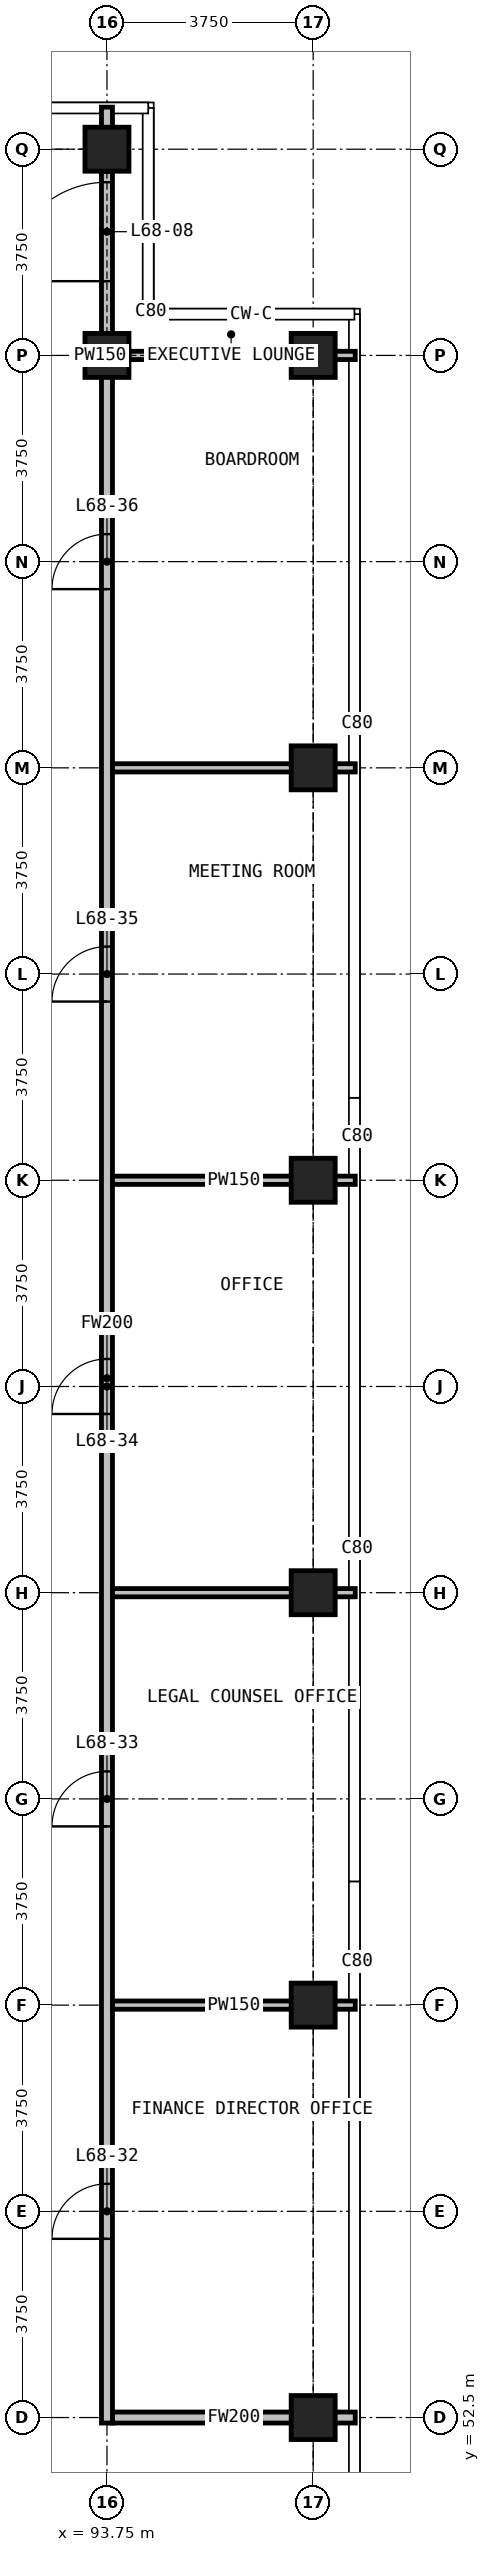
"""IFC4 building model, lengths in metres.
Left out: names, types, materials, properties, quantities, classifications, styles, units other than length and angle.
Written with IfcOpenShell. Run it as: python <this file> out.ifc"""

import sys

from ifc_helpers import new_model, si_unit, direction, frame, frame_2d, origin, origin_2d, place, context, subcontext, project, spatial, rectangle, extrude, element, fill, save


model = new_model("IFC4")
c1 = context("Model", 3, precision=1e-05, world=origin(), true_north=direction((0.0, 1.0)))
c2 = subcontext(c1, "Body", "Model", "MODEL_VIEW")
j1 = project(units=[si_unit("LENGTHUNIT", "METRE"), si_unit("PLANEANGLEUNIT", "RADIAN")], contexts=[c1])
p1 = place(None, origin())
s1 = spatial("IfcSite", under=j1, at=p1, CompositionType="ELEMENT")
p2 = place(p1, origin())
s2 = spatial("IfcBuilding", under=s1, at=p2, CompositionType="ELEMENT")
p3 = place(p2, frame((0.0, 0.0, 262.1)))
s3 = spatial("IfcBuildingStorey", under=s2, at=p3, CompositionType="ELEMENT", Elevation=262.1)
for number, where, z_axis, x_axis in (
    (1, (93.75, 90.0, 0.0), (0.0, 0.0, 1.0), (1.0, 0.0, 0.0)),
    (2, (93.75, 93.75, 0.0), (0.0, 0.0, 1.0), (1.0, 0.0, 0.0)),
    (3, (97.5, 52.5, 0.0), (0.0, 0.0, 1.0), (1.0, 0.0, 0.0)),
    (4, (97.5, 60.0, 0.0), (0.0, 0.0, 1.0), (1.0, 0.0, 0.0)),
    (5, (97.5, 67.5, 0.0), (0.0, 0.0, 1.0), (1.0, 0.0, 0.0)),
    (6, (97.5, 75.0, 0.0), (0.0, 0.0, 1.0), (1.0, 0.0, 0.0)),
    (7, (97.5, 82.5, 0.0), (0.0, 0.0, 1.0), (1.0, 0.0, 0.0)),
    (8, (97.5, 90.0, 0.0), (0.0, 0.0, 1.0), (1.0, 0.0, 0.0)),
):
    element("IfcColumn", number, at=place(p3, frame(where, z_axis=z_axis, x_axis=x_axis)), inside=s3, PredefinedType="COLUMN", context=c2, shape_type="SweptSolid", body=[
        extrude(rectangle(XDim=0.8, YDim=0.8, at=origin_2d()), origin(), (0.0, 0.0, 1.0), 3.6),
    ])
p4 = place(p3, frame((93.85, 52.5, 0.0), z_axis=(0.0, 0.0, 1.0), x_axis=(1.0, 0.0, 0.0)))
e9 = element("IfcWall", 9, at=p4, inside=s3, PredefinedType="PARTITIONING", context=c2, shape_type="SweptSolid", body=[
    extrude(rectangle(XDim=4.415, YDim=0.2, at=frame_2d((2.208, 0.0))), origin(), (0.0, 0.0, 1.0), 3.3),
])
p5 = place(p3, frame((93.75, 52.4, 0.0), z_axis=(0.0, 0.0, 1.0), x_axis=(0.0, 1.0, 0.0)))
e10 = element("IfcWall", 10, at=p5, inside=s3, PredefinedType="PARTITIONING", context=c2, shape_type="SweptSolid", body=[
    extrude(rectangle(XDim=38.0, YDim=0.2, at=frame_2d((19.0, 0.0))), origin(), (0.0, 0.0, 1.0), 3.3),
])
p6 = place(p5, frame((3.35, 0.0, 0.0)))
e11 = element("IfcOpeningElement", 11, at=p6, cuts=e10, PredefinedType="OPENING", context=c2, shape_type="SweptSolid", body=[
    extrude(rectangle(XDim=1.0, YDim=2.2, at=frame_2d((0.5, 1.1))), frame((0.0, 0.11, 0.0), z_axis=(0.0, -1.0, 0.0), x_axis=(1.0, 0.0, 0.0)), (0.0, 0.0, 1.0), 0.22),
])
p7 = place(p5, frame((10.85, 0.0, 0.0)))
e12 = element("IfcOpeningElement", 12, at=p7, cuts=e10, PredefinedType="OPENING", context=c2, shape_type="SweptSolid", body=[
    extrude(rectangle(XDim=1.0, YDim=2.2, at=frame_2d((0.5, 1.1))), frame((0.0, 0.11, 0.0), z_axis=(0.0, -1.0, 0.0), x_axis=(1.0, 0.0, 0.0)), (0.0, 0.0, 1.0), 0.22),
])
p8 = place(p5, frame((18.35, 0.0, 0.0)))
e13 = element("IfcOpeningElement", 13, at=p8, cuts=e10, PredefinedType="OPENING", context=c2, shape_type="SweptSolid", body=[
    extrude(rectangle(XDim=1.0, YDim=2.2, at=frame_2d((0.5, 1.1))), frame((0.0, 0.11, 0.0), z_axis=(0.0, -1.0, 0.0), x_axis=(1.0, 0.0, 0.0)), (0.0, 0.0, 1.0), 0.22),
])
p9 = place(p5, frame((25.85, 0.0, 0.0)))
e14 = element("IfcOpeningElement", 14, at=p9, cuts=e10, PredefinedType="OPENING", context=c2, shape_type="SweptSolid", body=[
    extrude(rectangle(XDim=1.0, YDim=2.2, at=frame_2d((0.5, 1.1))), frame((0.0, 0.11, 0.0), z_axis=(0.0, -1.0, 0.0), x_axis=(1.0, 0.0, 0.0)), (0.0, 0.0, 1.0), 0.22),
])
p10 = place(p5, frame((33.35, 0.0, 0.0)))
e15 = element("IfcOpeningElement", 15, at=p10, cuts=e10, PredefinedType="OPENING", context=c2, shape_type="SweptSolid", body=[
    extrude(rectangle(XDim=1.0, YDim=2.2, at=frame_2d((0.5, 1.1))), frame((0.0, 0.11, 0.0), z_axis=(0.0, -1.0, 0.0), x_axis=(1.0, 0.0, 0.0)), (0.0, 0.0, 1.0), 0.22),
])
p11 = place(p3, frame((93.75, 90.4, 0.0), z_axis=(0.0, 0.0, 1.0), x_axis=(0.0, 1.0, 0.0)))
e16 = element("IfcWall", 16, at=p11, inside=s3, PredefinedType="PARTITIONING", context=c2, shape_type="SweptSolid", body=[
    extrude(rectangle(XDim=2.95, YDim=0.2, at=frame_2d((1.475, 0.0))), origin(), (0.0, 0.0, 1.0), 2.5),
])
p12 = place(p11, frame((0.95, 0.0, 0.0)))
e17 = element("IfcOpeningElement", 17, at=p12, cuts=e16, PredefinedType="OPENING", context=c2, shape_type="SweptSolid", body=[
    extrude(rectangle(XDim=1.8, YDim=2.2, at=frame_2d((0.9, 1.1))), frame((0.0, 0.11, 0.0), z_axis=(0.0, -1.0, 0.0), x_axis=(1.0, 0.0, 0.0)), (0.0, 0.0, 1.0), 0.22),
])
p13 = place(p3, frame((93.75, 93.35, 0.0), z_axis=(0.0, 0.0, 1.0), x_axis=(0.0, 1.0, 0.0)))
e18 = element("IfcWall", 18, at=p13, inside=s3, PredefinedType="PARTITIONING", context=c2, shape_type="SweptSolid", body=[
    extrude(rectangle(XDim=1.165, YDim=0.2, at=frame_2d((0.583, 0.0))), origin(), (0.0, 0.0, 1.0), 3.3),
])
for number, where, z_axis, x_axis in (
    (19, (93.85, 60.0, 0.0), (0.0, 0.0, 1.0), (1.0, 0.0, 0.0)),
    (20, (93.85, 67.5, 0.0), (0.0, 0.0, 1.0), (1.0, 0.0, 0.0)),
    (21, (93.85, 75.0, 0.0), (0.0, 0.0, 1.0), (1.0, 0.0, 0.0)),
    (22, (93.85, 82.5, 0.0), (0.0, 0.0, 1.0), (1.0, 0.0, 0.0)),
):
    element("IfcWall", number, at=place(p3, frame(where, z_axis=z_axis, x_axis=x_axis)), inside=s3, PredefinedType="PARTITIONING", context=c2, shape_type="SweptSolid", body=[
        extrude(rectangle(XDim=4.415, YDim=0.15, at=frame_2d((2.208, 0.0))), origin(), (0.0, 0.0, 1.0), 3.3),
    ])
p14 = place(p3, frame((93.85, 90.0, 0.0), z_axis=(0.0, 0.0, 1.0), x_axis=(1.0, 0.0, 0.0)))
e23 = element("IfcWall", 23, at=p14, inside=s3, PredefinedType="PARTITIONING", context=c2, shape_type="SweptSolid", body=[
    extrude(rectangle(XDim=0.3, YDim=0.15, at=frame_2d((0.15, 0.0))), origin(), (0.0, 0.0, 1.0), 3.3),
])
p15 = place(p3, frame((94.15, 90.0, 0.0), z_axis=(0.0, 0.0, 1.0), x_axis=(1.0, 0.0, 0.0)))
e24 = element("IfcWall", 24, at=p15, inside=s3, PredefinedType="PARTITIONING", context=c2, shape_type="SweptSolid", body=[
    extrude(rectangle(XDim=2.95, YDim=0.15, at=frame_2d((1.475, 0.0))), origin(), (0.0, 0.0, 1.0), 2.5),
])
p16 = place(p3, frame((97.1, 90.0, 0.0), z_axis=(0.0, 0.0, 1.0), x_axis=(1.0, 0.0, 0.0)))
e25 = element("IfcWall", 25, at=p16, inside=s3, PredefinedType="PARTITIONING", context=c2, shape_type="SweptSolid", body=[
    extrude(rectangle(XDim=1.165, YDim=0.15, at=frame_2d((0.583, 0.0))), origin(), (0.0, 0.0, 1.0), 3.3),
])
p17 = place(p12, origin())
e26 = element("IfcDoor", 26, at=p17, inside=s3, OperationType="DOUBLE_DOOR_SINGLE_SWING", PredefinedType="DOOR", context=c2, shape_type="SweptSolid", body=[
    extrude(rectangle(XDim=1.8, YDim=2.2, at=frame_2d((0.9, 1.1))), frame((0.0, 0.025, 0.0), z_axis=(0.0, -1.0, 0.0), x_axis=(1.0, 0.0, 0.0)), (0.0, 0.0, 1.0), 0.05),
])
fill(e17, e26)
p18 = place(p6, origin())
e27 = element("IfcDoor", 27, at=p18, inside=s3, OperationType="SINGLE_SWING_LEFT", PredefinedType="DOOR", context=c2, shape_type="SweptSolid", body=[
    extrude(rectangle(XDim=1.0, YDim=2.2, at=frame_2d((0.5, 1.1))), frame((0.0, 0.025, 0.0), z_axis=(0.0, -1.0, 0.0), x_axis=(1.0, 0.0, 0.0)), (0.0, 0.0, 1.0), 0.05),
])
fill(e11, e27)
p19 = place(p7, origin())
e28 = element("IfcDoor", 28, at=p19, inside=s3, OperationType="SINGLE_SWING_LEFT", PredefinedType="DOOR", context=c2, shape_type="SweptSolid", body=[
    extrude(rectangle(XDim=1.0, YDim=2.2, at=frame_2d((0.5, 1.1))), frame((0.0, 0.025, 0.0), z_axis=(0.0, -1.0, 0.0), x_axis=(1.0, 0.0, 0.0)), (0.0, 0.0, 1.0), 0.05),
])
fill(e12, e28)
p20 = place(p8, origin())
e29 = element("IfcDoor", 29, at=p20, inside=s3, OperationType="SINGLE_SWING_RIGHT", PredefinedType="DOOR", context=c2, shape_type="SweptSolid", body=[
    extrude(rectangle(XDim=1.0, YDim=2.2, at=frame_2d((0.5, 1.1))), frame((0.0, 0.025, 0.0), z_axis=(0.0, -1.0, 0.0), x_axis=(1.0, 0.0, 0.0)), (0.0, 0.0, 1.0), 0.05),
])
fill(e13, e29)
p21 = place(p9, origin())
e30 = element("IfcDoor", 30, at=p21, inside=s3, OperationType="SINGLE_SWING_LEFT", PredefinedType="DOOR", context=c2, shape_type="SweptSolid", body=[
    extrude(rectangle(XDim=1.0, YDim=2.2, at=frame_2d((0.5, 1.1))), frame((0.0, 0.025, 0.0), z_axis=(0.0, -1.0, 0.0), x_axis=(1.0, 0.0, 0.0)), (0.0, 0.0, 1.0), 0.05),
])
fill(e14, e30)
p22 = place(p10, origin())
e31 = element("IfcDoor", 31, at=p22, inside=s3, OperationType="SINGLE_SWING_LEFT", PredefinedType="DOOR", context=c2, shape_type="SweptSolid", body=[
    extrude(rectangle(XDim=1.0, YDim=2.2, at=frame_2d((0.5, 1.1))), frame((0.0, 0.025, 0.0), z_axis=(0.0, -1.0, 0.0), x_axis=(1.0, 0.0, 0.0)), (0.0, 0.0, 1.0), 0.05),
])
fill(e15, e31)
save(model, sys.argv[1])
